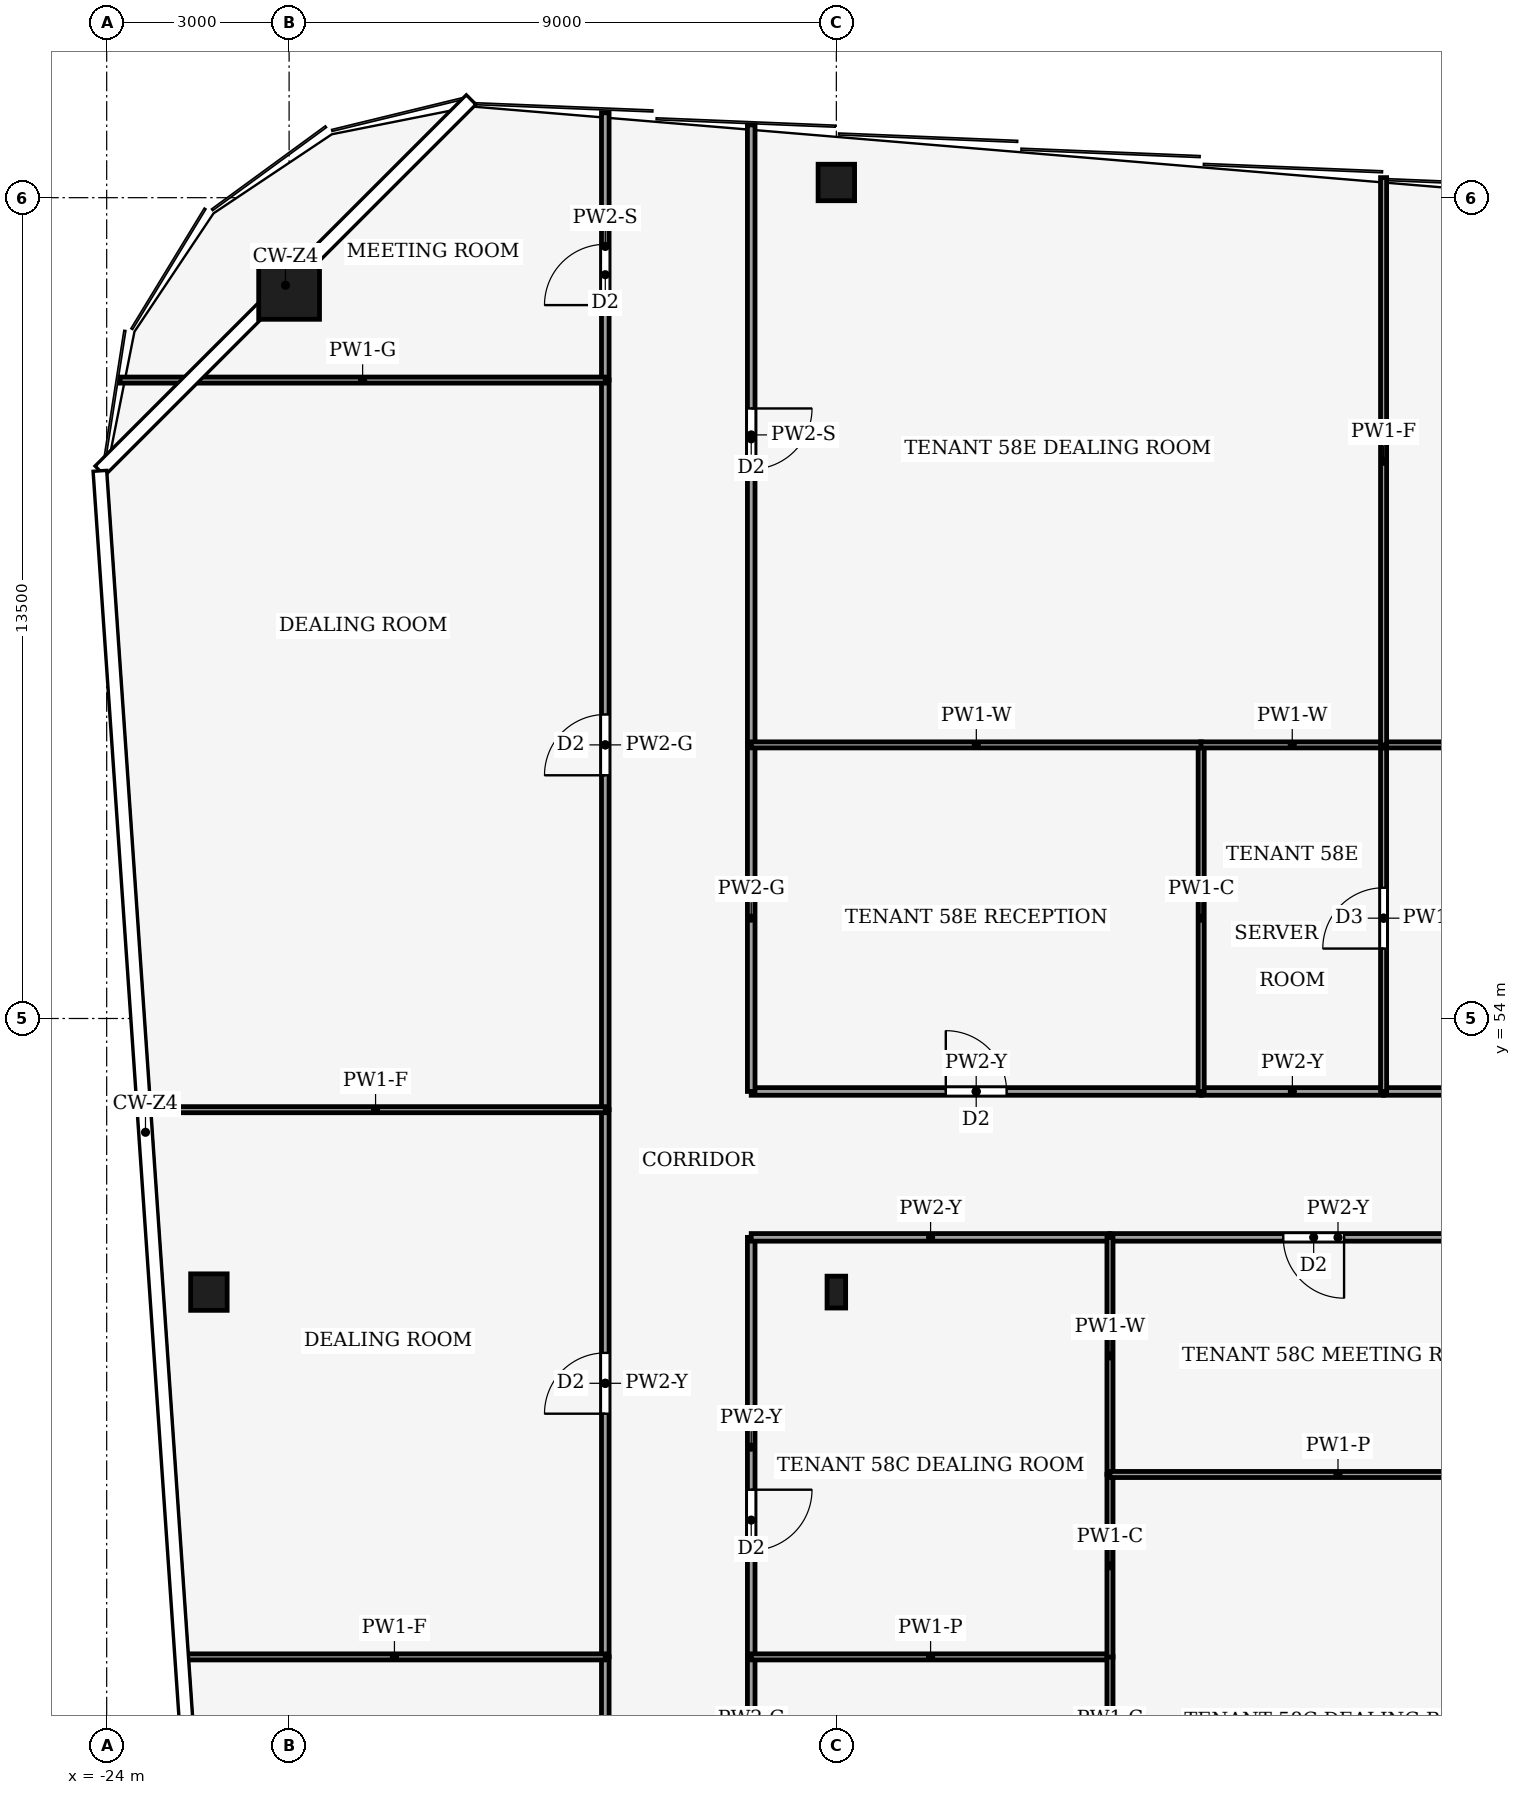
"""IFC4 building model, lengths in metres.
Left out: names, types, materials, properties, quantities, classifications, styles, units other than length and angle.
Written with IfcOpenShell. Run it as: python <this file> out.ifc"""

import sys

from ifc_helpers import new_model, si_unit, direction, frame, frame_2d, origin, origin_2d, place, context, subcontext, project, spatial, rectangle, hollow_rectangle, i_section, extrude, element, fill, save


model = new_model("IFC4")
c1 = context("Model", 3, precision=1e-05, world=origin(), true_north=direction((0.0, 1.0)))
c2 = subcontext(c1, "Body", "Model", "MODEL_VIEW")
j1 = project(units=[si_unit("LENGTHUNIT", "METRE"), si_unit("PLANEANGLEUNIT", "RADIAN")], contexts=[c1])
p1 = place(None, origin())
s1 = spatial("IfcSite", under=j1, at=p1, CompositionType="ELEMENT")
p2 = place(p1, origin())
s2 = spatial("IfcBuilding", under=s1, at=p2, CompositionType="ELEMENT")
p3 = place(p2, frame((0.0, 0.0, 254.0)))
s3 = spatial("IfcBuildingStorey", under=s2, at=p3, CompositionType="ELEMENT", Elevation=254.0)
p4 = place(p3, frame((-21.0, 66.0, 0.0), z_axis=(0.0, 0.0, 1.0), x_axis=(1.0, 0.0, 0.0)))
e1 = element("IfcColumn", 1, at=p4, inside=s3, PredefinedType="COLUMN", context=c2, shape_type="SweptSolid", body=[
    extrude(hollow_rectangle(XDim=1.0, YDim=1.0, WallThickness=0.045, at=origin_2d()), origin(), (0.0, 0.0, 1.0), 4.0),
])
for number, where, z_axis, x_axis in (
    (2, (-12.0, 67.75, 0.0), (0.0, 0.0, 1.0), (1.0, 0.0, 0.0)),
    (3, (-22.319, 49.5, 0.0), (0.0, 0.0, 1.0), (1.0, 0.0, 0.0)),
):
    element("IfcColumn", number, at=place(p3, frame(where, z_axis=z_axis, x_axis=x_axis)), inside=s3, PredefinedType="COLUMN", context=c2, shape_type="SweptSolid", body=[
        extrude(hollow_rectangle(XDim=0.6, YDim=0.6, WallThickness=0.025, at=origin_2d()), origin(), (0.0, 0.0, 1.0), 4.0),
    ])
p5 = place(p3, frame((-12.0, 49.5, 0.0), z_axis=(0.0, 0.0, 1.0), x_axis=(1.0, 0.0, 0.0)))
e4 = element("IfcColumn", 4, at=p5, inside=s3, PredefinedType="COLUMN", context=c2, shape_type="SweptSolid", body=[
    extrude(i_section(OverallWidth=0.306, OverallDepth=0.524, WebThickness=0.012, FlangeThickness=0.04, FilletRadius=0.027, at=origin_2d()), origin(), (0.0, 0.0, 1.0), 4.0),
])
p6 = place(p3, frame((-15.8, 31.5, 0.0), z_axis=(0.0, 0.0, 1.0), x_axis=(0.0, 1.0, 0.0)))
e5 = element("IfcWall", 5, at=p6, inside=s3, PredefinedType="PARTITIONING", context=c2, shape_type="SweptSolid", body=[
    extrude(rectangle(XDim=12.0, YDim=0.125, at=frame_2d((6.0, 0.0))), origin(), (0.0, 0.0, 1.0), 3.14),
])
p7 = place(p6, frame((5.5, 0.0, 0.0)))
e6 = element("IfcOpeningElement", 6, at=p7, cuts=e5, PredefinedType="OPENING", context=c2, shape_type="SweptSolid", body=[
    extrude(rectangle(XDim=1.0, YDim=2.1, at=frame_2d((0.5, 1.05))), frame((0.0, 0.073, 0.0), z_axis=(0.0, -1.0, 0.0), x_axis=(1.0, 0.0, 0.0)), (0.0, 0.0, 1.0), 0.145),
])
p8 = place(p3, frame((-15.8, 43.5, 0.0), z_axis=(0.0, 0.0, 1.0), x_axis=(0.0, 1.0, 0.0)))
e7 = element("IfcWall", 7, at=p8, inside=s3, PredefinedType="PARTITIONING", context=c2, shape_type="SweptSolid", body=[
    extrude(rectangle(XDim=9.0, YDim=0.125, at=frame_2d((4.5, 0.0))), origin(), (0.0, 0.0, 1.0), 3.24),
])
p9 = place(p8, frame((4.0, 0.0, 0.0)))
e8 = element("IfcOpeningElement", 8, at=p9, cuts=e7, PredefinedType="OPENING", context=c2, shape_type="SweptSolid", body=[
    extrude(rectangle(XDim=1.0, YDim=2.1, at=frame_2d((0.5, 1.05))), frame((0.0, 0.073, 0.0), z_axis=(0.0, -1.0, 0.0), x_axis=(1.0, 0.0, 0.0)), (0.0, 0.0, 1.0), 0.145),
])
p10 = place(p3, frame((-15.8, 52.5, 0.0), z_axis=(0.0, 0.0, 1.0), x_axis=(0.0, 1.0, 0.0)))
e9 = element("IfcWall", 9, at=p10, inside=s3, PredefinedType="PARTITIONING", context=c2, shape_type="SweptSolid", body=[
    extrude(rectangle(XDim=12.0, YDim=0.125, at=frame_2d((6.0, 0.0))), origin(), (0.0, 0.0, 1.0), 3.87),
])
p11 = place(p10, frame((5.5, 0.0, 0.0)))
e10 = element("IfcOpeningElement", 10, at=p11, cuts=e9, PredefinedType="OPENING", context=c2, shape_type="SweptSolid", body=[
    extrude(rectangle(XDim=1.0, YDim=2.1, at=frame_2d((0.5, 1.05))), frame((0.0, 0.073, 0.0), z_axis=(0.0, -1.0, 0.0), x_axis=(1.0, 0.0, 0.0)), (0.0, 0.0, 1.0), 0.145),
])
p12 = place(p3, frame((-15.8, 64.5, 0.0), z_axis=(0.0, 0.0, 1.0), x_axis=(0.0, 1.0, 0.0)))
e11 = element("IfcWall", 11, at=p12, inside=s3, PredefinedType="PARTITIONING", context=c2, shape_type="SweptSolid", body=[
    extrude(rectangle(XDim=4.397, YDim=0.125, at=frame_2d((2.198, 0.0))), origin(), (0.0, 0.0, 1.0), 3.04),
])
p13 = place(p12, frame((1.233, 0.0, 0.0)))
e12 = element("IfcOpeningElement", 12, at=p13, cuts=e11, PredefinedType="OPENING", context=c2, shape_type="SweptSolid", body=[
    extrude(rectangle(XDim=1.0, YDim=2.1, at=frame_2d((0.5, 1.05))), frame((0.0, 0.073, 0.0), z_axis=(0.0, -1.0, 0.0), x_axis=(1.0, 0.0, 0.0)), (0.0, 0.0, 1.0), 0.145),
])
p14 = place(p3, frame((-13.4, 40.5, 0.0), z_axis=(0.0, 0.0, 1.0), x_axis=(0.0, 1.0, 0.0)))
e13 = element("IfcWall", 13, at=p14, inside=s3, PredefinedType="PARTITIONING", context=c2, shape_type="SweptSolid", body=[
    extrude(rectangle(XDim=3.0, YDim=0.125, at=frame_2d((1.5, 0.0))), origin(), (0.0, 0.0, 1.0), 3.87),
])
p15 = place(p3, frame((-13.4, 50.4, 0.0), z_axis=(0.0, 0.0, 1.0), x_axis=(0.0, -1.0, 0.0)))
e14 = element("IfcWall", 14, at=p15, inside=s3, PredefinedType="PARTITIONING", context=c2, shape_type="SweptSolid", body=[
    extrude(rectangle(XDim=6.9, YDim=0.125, at=frame_2d((3.45, 0.0))), origin(), (0.0, 0.0, 1.0), 3.24),
])
p16 = place(p15, frame((4.15, 0.0, 0.0)))
e15 = element("IfcOpeningElement", 15, at=p16, cuts=e14, PredefinedType="OPENING", context=c2, shape_type="SweptSolid", body=[
    extrude(rectangle(XDim=1.0, YDim=2.1, at=frame_2d((0.5, 1.05))), frame((0.0, 0.073, 0.0), z_axis=(0.0, -1.0, 0.0), x_axis=(1.0, 0.0, 0.0)), (0.0, 0.0, 1.0), 0.145),
])
p17 = place(p3, frame((-7.5, 50.4, 0.0), z_axis=(0.0, 0.0, 1.0), x_axis=(-1.0, 0.0, 0.0)))
e16 = element("IfcWall", 16, at=p17, inside=s3, PredefinedType="PARTITIONING", context=c2, shape_type="SweptSolid", body=[
    extrude(rectangle(XDim=5.9, YDim=0.125, at=frame_2d((2.95, 0.0))), origin(), (0.0, 0.0, 1.0), 3.24),
])
p18 = place(p3, frame((0.0, 50.4, 0.0), z_axis=(0.0, 0.0, 1.0), x_axis=(-1.0, 0.0, 0.0)))
e17 = element("IfcWall", 17, at=p18, inside=s3, PredefinedType="PARTITIONING", context=c2, shape_type="SweptSolid", body=[
    extrude(rectangle(XDim=7.5, YDim=0.125, at=frame_2d((3.75, 0.0))), origin(), (0.0, 0.0, 1.0), 3.24),
])
p19 = place(p18, frame((3.65, 0.0, 0.0)))
e18 = element("IfcOpeningElement", 18, at=p19, cuts=e17, PredefinedType="OPENING", context=c2, shape_type="SweptSolid", body=[
    extrude(rectangle(XDim=1.0, YDim=2.1, at=frame_2d((0.5, 1.05))), frame((0.0, 0.073, 0.0), z_axis=(0.0, -1.0, 0.0), x_axis=(1.0, 0.0, 0.0)), (0.0, 0.0, 1.0), 0.145),
])
p20 = place(p3, frame((-13.4, 52.8, 0.0), z_axis=(0.0, 0.0, 1.0), x_axis=(1.0, 0.0, 0.0)))
e19 = element("IfcWall", 19, at=p20, inside=s3, PredefinedType="PARTITIONING", context=c2, shape_type="SweptSolid", body=[
    extrude(rectangle(XDim=7.4, YDim=0.125, at=frame_2d((3.7, 0.0))), origin(), (0.0, 0.0, 1.0), 3.24),
])
p21 = place(p20, frame((3.2, 0.0, 0.0)))
e20 = element("IfcOpeningElement", 20, at=p21, cuts=e19, PredefinedType="OPENING", context=c2, shape_type="SweptSolid", body=[
    extrude(rectangle(XDim=1.0, YDim=2.1, at=frame_2d((0.5, 1.05))), frame((0.0, 0.073, 0.0), z_axis=(0.0, -1.0, 0.0), x_axis=(1.0, 0.0, 0.0)), (0.0, 0.0, 1.0), 0.145),
])
p22 = place(p3, frame((-13.4, 52.8, 0.0), z_axis=(0.0, 0.0, 1.0), x_axis=(0.0, 1.0, 0.0)))
e21 = element("IfcWall", 21, at=p22, inside=s3, PredefinedType="PARTITIONING", context=c2, shape_type="SweptSolid", body=[
    extrude(rectangle(XDim=5.7, YDim=0.125, at=frame_2d((2.85, 0.0))), origin(), (0.0, 0.0, 1.0), 3.87),
])
p23 = place(p3, frame((-3.0, 52.8, 0.0), z_axis=(0.0, 0.0, 1.0), x_axis=(-1.0, 0.0, 0.0)))
e22 = element("IfcWall", 22, at=p23, inside=s3, PredefinedType="PARTITIONING", context=c2, shape_type="SweptSolid", body=[
    extrude(rectangle(XDim=3.0, YDim=0.125, at=frame_2d((1.5, 0.0))), origin(), (0.0, 0.0, 1.0), 3.24),
])
p24 = place(p3, frame((9.0, 52.8, 0.0), z_axis=(0.0, 0.0, 1.0), x_axis=(-1.0, 0.0, 0.0)))
e23 = element("IfcWall", 23, at=p24, inside=s3, PredefinedType="PARTITIONING", context=c2, shape_type="SweptSolid", body=[
    extrude(rectangle(XDim=12.0, YDim=0.125, at=frame_2d((6.0, 0.0))), origin(), (0.0, 0.0, 1.0), 3.24),
])
p25 = place(p24, frame((2.3, 0.0, 0.0)))
e24 = element("IfcOpeningElement", 24, at=p25, cuts=e23, PredefinedType="OPENING", context=c2, shape_type="SweptSolid", body=[
    extrude(rectangle(XDim=1.0, YDim=2.1, at=frame_2d((0.5, 1.05))), frame((0.0, 0.073, 0.0), z_axis=(0.0, -1.0, 0.0), x_axis=(1.0, 0.0, 0.0)), (0.0, 0.0, 1.0), 0.145),
])
p26 = place(p3, frame((-13.4, 68.697, 0.0), z_axis=(0.0, 0.0, 1.0), x_axis=(0.0, -1.0, 0.0)))
e25 = element("IfcWall", 25, at=p26, inside=s3, PredefinedType="PARTITIONING", context=c2, shape_type="SweptSolid", body=[
    extrude(rectangle(XDim=10.197, YDim=0.125, at=frame_2d((5.098, 0.0))), origin(), (0.0, 0.0, 1.0), 3.04),
])
p27 = place(p26, frame((4.663, 0.0, 0.0)))
e26 = element("IfcOpeningElement", 26, at=p27, cuts=e25, PredefinedType="OPENING", context=c2, shape_type="SweptSolid", body=[
    extrude(rectangle(XDim=1.0, YDim=2.1, at=frame_2d((0.5, 1.05))), frame((0.0, 0.073, 0.0), z_axis=(0.0, -1.0, 0.0), x_axis=(1.0, 0.0, 0.0)), (0.0, 0.0, 1.0), 0.145),
])
p28 = place(p3, frame((-15.8, 43.5, 0.0), z_axis=(0.0, 0.0, 1.0), x_axis=(-1.0, 0.0, 0.0)))
e27 = element("IfcWall", 27, at=p28, inside=s3, PredefinedType="PARTITIONING", context=c2, shape_type="SweptSolid", body=[
    extrude(rectangle(XDim=6.935, YDim=0.1, at=frame_2d((3.468, 0.0))), origin(), (0.0, 0.0, 1.0), 3.04),
])
p29 = place(p3, frame((-15.8, 52.5, 0.0), z_axis=(0.0, 0.0, 1.0), x_axis=(-1.0, 0.0, 0.0)))
e28 = element("IfcWall", 28, at=p29, inside=s3, PredefinedType="PARTITIONING", context=c2, shape_type="SweptSolid", body=[
    extrude(rectangle(XDim=7.556, YDim=0.1, at=frame_2d((3.778, 0.0))), origin(), (0.0, 0.0, 1.0), 3.04),
])
p30 = place(p3, frame((-15.8, 64.5, 0.0), z_axis=(0.0, 0.0, 1.0), x_axis=(-1.0, 0.0, 0.0)))
e29 = element("IfcWall", 29, at=p30, inside=s3, PredefinedType="PARTITIONING", context=c2, shape_type="SweptSolid", body=[
    extrude(rectangle(XDim=7.981, YDim=0.1, at=frame_2d((3.991, 0.0))), origin(), (0.0, 0.0, 1.0), 2.93),
])
p31 = place(p3, frame((-7.5, 43.5, 0.0), z_axis=(0.0, 0.0, 1.0), x_axis=(-1.0, 0.0, 0.0)))
e30 = element("IfcWall", 30, at=p31, inside=s3, PredefinedType="PARTITIONING", context=c2, shape_type="SweptSolid", body=[
    extrude(rectangle(XDim=5.9, YDim=0.1, at=frame_2d((2.95, 0.0))), origin(), (0.0, 0.0, 1.0), 3.44),
])
p32 = place(p3, frame((-7.5, 40.496, 0.0), z_axis=(0.0, 0.0, 1.0), x_axis=(0.0, 1.0, 0.0)))
e31 = element("IfcWall", 31, at=p32, inside=s3, PredefinedType="PARTITIONING", context=c2, shape_type="SweptSolid", body=[
    extrude(rectangle(XDim=3.008, YDim=0.1, at=frame_2d((1.504, 0.0))), origin(), (0.0, 0.0, 1.0), 3.87),
])
p33 = place(p3, frame((-7.5, 43.496, 0.0), z_axis=(0.0, 0.0, 1.0), x_axis=(0.0, 1.0, 0.0)))
e32 = element("IfcWall", 32, at=p33, inside=s3, PredefinedType="PARTITIONING", context=c2, shape_type="SweptSolid", body=[
    extrude(rectangle(XDim=3.004, YDim=0.1, at=frame_2d((1.502, 0.0))), origin(), (0.0, 0.0, 1.0), 3.87),
])
p34 = place(p3, frame((-7.5, 46.5, 0.0), z_axis=(0.0, 0.0, 1.0), x_axis=(0.0, 1.0, 0.0)))
e33 = element("IfcWall", 33, at=p34, inside=s3, PredefinedType="PARTITIONING", context=c2, shape_type="SweptSolid", body=[
    extrude(rectangle(XDim=3.9, YDim=0.1, at=frame_2d((1.95, 0.0))), origin(), (0.0, 0.0, 1.0), 3.24),
])
p35 = place(p3, frame((0.0, 46.5, 0.0), z_axis=(0.0, 0.0, 1.0), x_axis=(-1.0, 0.0, 0.0)))
e34 = element("IfcWall", 34, at=p35, inside=s3, PredefinedType="PARTITIONING", context=c2, shape_type="SweptSolid", body=[
    extrude(rectangle(XDim=7.5, YDim=0.1, at=frame_2d((3.75, 0.0))), origin(), (0.0, 0.0, 1.0), 3.44),
])
p36 = place(p3, frame((-6.0, 52.8, 0.0), z_axis=(0.0, 0.0, 1.0), x_axis=(0.0, 1.0, 0.0)))
e35 = element("IfcWall", 35, at=p36, inside=s3, PredefinedType="PARTITIONING", context=c2, shape_type="SweptSolid", body=[
    extrude(rectangle(XDim=5.7, YDim=0.1, at=frame_2d((2.85, 0.0))), origin(), (0.0, 0.0, 1.0), 3.87),
])
p37 = place(p3, frame((-5.996, 58.5, 0.0), z_axis=(0.0, 0.0, 1.0), x_axis=(-1.0, 0.0, 0.0)))
e36 = element("IfcWall", 36, at=p37, inside=s3, PredefinedType="PARTITIONING", context=c2, shape_type="SweptSolid", body=[
    extrude(rectangle(XDim=7.404, YDim=0.1, at=frame_2d((3.702, 0.0))), origin(), (0.0, 0.0, 1.0), 3.24),
])
p38 = place(p3, frame((-3.0, 52.8, 0.0), z_axis=(0.0, 0.0, 1.0), x_axis=(0.0, 1.0, 0.0)))
e37 = element("IfcWall", 37, at=p38, inside=s3, PredefinedType="PARTITIONING", context=c2, shape_type="SweptSolid", body=[
    extrude(rectangle(XDim=5.7, YDim=0.1, at=frame_2d((2.85, 0.0))), origin(), (0.0, 0.0, 1.0), 3.87),
])
p39 = place(p38, frame((2.35, 0.0, 0.0)))
e38 = element("IfcOpeningElement", 38, at=p39, cuts=e37, PredefinedType="OPENING", context=c2, shape_type="SweptSolid", body=[
    extrude(rectangle(XDim=1.0, YDim=2.1, at=frame_2d((0.5, 1.05))), frame((0.0, 0.06, 0.0), z_axis=(0.0, -1.0, 0.0), x_axis=(1.0, 0.0, 0.0)), (0.0, 0.0, 1.0), 0.12),
])
p40 = place(p3, frame((-3.0, 58.5, 0.0), z_axis=(0.0, 0.0, 1.0), x_axis=(-1.0, 0.0, 0.0)))
e39 = element("IfcWall", 39, at=p40, inside=s3, PredefinedType="PARTITIONING", context=c2, shape_type="SweptSolid", body=[
    extrude(rectangle(XDim=3.004, YDim=0.1, at=frame_2d((1.502, 0.0))), origin(), (0.0, 0.0, 1.0), 3.24),
])
p41 = place(p3, frame((-3.0, 58.5, 0.0), z_axis=(0.0, 0.0, 1.0), x_axis=(1.0, 0.0, 0.0)))
e40 = element("IfcWall", 40, at=p41, inside=s3, PredefinedType="PARTITIONING", context=c2, shape_type="SweptSolid", body=[
    extrude(rectangle(XDim=9.0, YDim=0.1, at=frame_2d((4.5, 0.0))), origin(), (0.0, 0.0, 1.0), 3.24),
])
p42 = place(p41, frame((4.0, 0.0, 0.0)))
e41 = element("IfcOpeningElement", 41, at=p42, cuts=e40, PredefinedType="OPENING", context=c2, shape_type="SweptSolid", body=[
    extrude(rectangle(XDim=1.0, YDim=2.1, at=frame_2d((0.5, 1.05))), frame((0.0, 0.06, 0.0), z_axis=(0.0, -1.0, 0.0), x_axis=(1.0, 0.0, 0.0)), (0.0, 0.0, 1.0), 0.12),
])
p43 = place(p3, frame((-3.0, 58.5, 0.0), z_axis=(0.0, 0.0, 1.0), x_axis=(0.0, 1.0, 0.0)))
e42 = element("IfcWall", 42, at=p43, inside=s3, PredefinedType="PARTITIONING", context=c2, shape_type="SweptSolid", body=[
    extrude(rectangle(XDim=9.33, YDim=0.1, at=frame_2d((4.665, 0.0))), origin(), (0.0, 0.0, 1.0), 3.04),
])
p44 = place(p9, origin())
e43 = element("IfcDoor", 43, at=p44, inside=s3, OperationType="SINGLE_SWING_RIGHT", PredefinedType="DOOR", context=c2, shape_type="SweptSolid", body=[
    extrude(rectangle(XDim=1.0, YDim=2.1, at=frame_2d((0.5, 1.05))), frame((0.0, 0.025, 0.0), z_axis=(0.0, -1.0, 0.0), x_axis=(1.0, 0.0, 0.0)), (0.0, 0.0, 1.0), 0.05),
])
fill(e8, e43)
p45 = place(p11, origin())
e44 = element("IfcDoor", 44, at=p45, inside=s3, OperationType="SINGLE_SWING_LEFT", PredefinedType="DOOR", context=c2, shape_type="SweptSolid", body=[
    extrude(rectangle(XDim=1.0, YDim=2.1, at=frame_2d((0.5, 1.05))), frame((0.0, 0.025, 0.0), z_axis=(0.0, -1.0, 0.0), x_axis=(1.0, 0.0, 0.0)), (0.0, 0.0, 1.0), 0.05),
])
fill(e10, e44)
p46 = place(p13, origin())
e45 = element("IfcDoor", 45, at=p46, inside=s3, OperationType="SINGLE_SWING_LEFT", PredefinedType="DOOR", context=c2, shape_type="SweptSolid", body=[
    extrude(rectangle(XDim=1.0, YDim=2.1, at=frame_2d((0.5, 1.05))), frame((0.0, 0.025, 0.0), z_axis=(0.0, -1.0, 0.0), x_axis=(1.0, 0.0, 0.0)), (0.0, 0.0, 1.0), 0.05),
])
fill(e12, e45)
p47 = place(p16, origin())
e46 = element("IfcDoor", 46, at=p47, inside=s3, OperationType="SINGLE_SWING_RIGHT", PredefinedType="DOOR", context=c2, shape_type="SweptSolid", body=[
    extrude(rectangle(XDim=1.0, YDim=2.1, at=frame_2d((0.5, 1.05))), frame((0.0, 0.025, 0.0), z_axis=(0.0, -1.0, 0.0), x_axis=(1.0, 0.0, 0.0)), (0.0, 0.0, 1.0), 0.05),
])
fill(e15, e46)
p48 = place(p19, origin())
e47 = element("IfcDoor", 47, at=p48, inside=s3, OperationType="SINGLE_SWING_RIGHT", PredefinedType="DOOR", context=c2, shape_type="SweptSolid", body=[
    extrude(rectangle(XDim=1.0, YDim=2.1, at=frame_2d((0.5, 1.05))), frame((0.0, 0.025, 0.0), z_axis=(0.0, -1.0, 0.0), x_axis=(1.0, 0.0, 0.0)), (0.0, 0.0, 1.0), 0.05),
])
fill(e18, e47)
p49 = place(p21, origin())
e48 = element("IfcDoor", 48, at=p49, inside=s3, OperationType="SINGLE_SWING_RIGHT", PredefinedType="DOOR", context=c2, shape_type="SweptSolid", body=[
    extrude(rectangle(XDim=1.0, YDim=2.1, at=frame_2d((0.5, 1.05))), frame((0.0, 0.025, 0.0), z_axis=(0.0, -1.0, 0.0), x_axis=(1.0, 0.0, 0.0)), (0.0, 0.0, 1.0), 0.05),
])
fill(e20, e48)
p50 = place(p27, origin())
e49 = element("IfcDoor", 49, at=p50, inside=s3, OperationType="SINGLE_SWING_RIGHT", PredefinedType="DOOR", context=c2, shape_type="SweptSolid", body=[
    extrude(rectangle(XDim=1.0, YDim=2.1, at=frame_2d((0.5, 1.05))), frame((0.0, 0.025, 0.0), z_axis=(0.0, -1.0, 0.0), x_axis=(1.0, 0.0, 0.0)), (0.0, 0.0, 1.0), 0.05),
])
fill(e26, e49)
p51 = place(p39, origin())
e50 = element("IfcDoor", 50, at=p51, inside=s3, OperationType="SINGLE_SWING_RIGHT", PredefinedType="DOOR", context=c2, shape_type="SweptSolid", body=[
    extrude(rectangle(XDim=1.0, YDim=2.1, at=frame_2d((0.5, 1.05))), frame((0.0, 0.025, 0.0), z_axis=(0.0, -1.0, 0.0), x_axis=(1.0, 0.0, 0.0)), (0.0, 0.0, 1.0), 0.05),
])
fill(e38, e50)
save(model, sys.argv[1])
